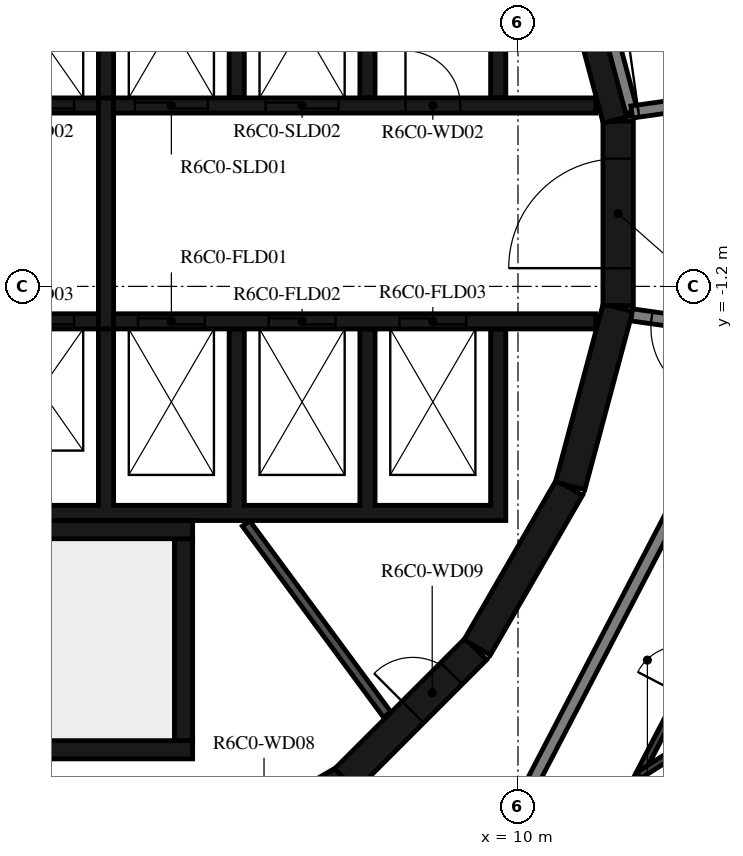
"""IFC4 building model, lengths in metres.
Left out: names, types, materials, properties, quantities, classifications, styles, units other than length and angle.
Written with IfcOpenShell. Run it as: python <this file> out.ifc"""

import sys

from ifc_helpers import new_model, si_unit, direction, frame, frame_2d, origin, place, context, subcontext, project, spatial, polyline, rectangle, outline, extrude, element, fill, save


model = new_model("IFC4")
c1 = context("Model", 3, precision=1e-05, world=origin(), true_north=direction((0.0, 1.0)))
c2 = subcontext(c1, "Body", "Model", "MODEL_VIEW")
j1 = project(units=[si_unit("LENGTHUNIT", "METRE"), si_unit("PLANEANGLEUNIT", "RADIAN")], contexts=[c1])
p1 = place(None, origin())
s1 = spatial("IfcSite", under=j1, at=p1, CompositionType="ELEMENT")
p2 = place(p1, origin())
s2 = spatial("IfcBuilding", under=s1, at=p2, CompositionType="ELEMENT")
p3 = place(p2, frame((0.0, 0.0, 247.7)))
s3 = spatial("IfcBuildingStorey", under=s2, at=p3, CompositionType="ELEMENT", Elevation=247.7)
p4 = place(p3, frame((4.51, -10.845, 0.0), z_axis=(0.0, 0.0, 1.0), x_axis=(0.865975092491, 0.500087131594, 0.0)))
e1 = element("IfcWall", 1, at=p4, inside=s3, PredefinedType="SHEAR", context=c2, shape_type="SweptSolid", body=[
    extrude(rectangle(XDim=3.033, YDim=0.5, at=frame_2d((1.516, 0.0))), origin(), (0.0, 0.0, 1.0), 3.12),
])
p5 = place(p4, frame((1.066, 0.0, 0.0)))
e2 = element("IfcOpeningElement", 2, at=p5, cuts=e1, PredefinedType="OPENING", context=c2, shape_type="SweptSolid", body=[
    extrude(rectangle(XDim=0.9, YDim=2.1, at=frame_2d((0.45, 1.05))), frame((0.0, 0.26, 0.0), z_axis=(0.0, -1.0, 0.0), x_axis=(1.0, 0.0, 0.0)), (0.0, 0.0, 1.0), 0.52),
])
p6 = place(p3, frame((7.164, -9.308, 0.0), z_axis=(0.0, 0.0, 1.0), x_axis=(0.707106781187, 0.707106781187, 0.0)))
e3 = element("IfcWall", 3, at=p6, inside=s3, PredefinedType="SHEAR", context=c2, shape_type="SweptSolid", body=[
    extrude(rectangle(XDim=3.032, YDim=0.5, at=frame_2d((1.516, 0.0))), origin(), (0.0, 0.0, 1.0), 3.12),
])
p7 = place(p6, frame((1.566, 0.0, 0.0)))
e4 = element("IfcOpeningElement", 4, at=p7, cuts=e3, PredefinedType="OPENING", context=c2, shape_type="SweptSolid", body=[
    extrude(rectangle(XDim=0.9, YDim=2.1, at=frame_2d((0.45, 1.05))), frame((0.0, 0.26, 0.0), z_axis=(0.0, -1.0, 0.0), x_axis=(1.0, 0.0, 0.0)), (0.0, 0.0, 1.0), 0.52),
])
for number, where, z_axis, x_axis in (
    (5, (9.329, -7.137, 0.0), (0.0, 0.0, 1.0), (0.5, 0.866, 0.0)),
    (6, (10.858, -4.479, 0.0), (0.0, 0.0, 1.0), (0.259, 0.966, 0.0)),
):
    element("IfcWall", number, at=place(p3, frame(where, z_axis=z_axis, x_axis=x_axis)), inside=s3, PredefinedType="SHEAR", context=c2, shape_type="SweptSolid", body=[
        extrude(rectangle(XDim=3.033, YDim=0.5, at=frame_2d((1.516, 0.0))), origin(), (0.0, 0.0, 1.0), 3.12),
    ])
p8 = place(p3, frame((11.647, -1.516, 0.0), z_axis=(0.0, 0.0, 1.0), x_axis=(0.0, 1.0, 0.0)))
e7 = element("IfcWall", 7, at=p8, inside=s3, PredefinedType="SHEAR", context=c2, shape_type="SweptSolid", body=[
    extrude(rectangle(XDim=3.033, YDim=0.5, at=frame_2d((1.516, 0.0))), origin(), (0.0, 0.0, 1.0), 3.12),
])
p9 = place(p8, frame((0.616, 0.0, 0.0)))
e8 = element("IfcOpeningElement", 8, at=p9, cuts=e7, PredefinedType="OPENING", context=c2, shape_type="SweptSolid", body=[
    extrude(rectangle(XDim=1.8, YDim=2.1, at=frame_2d((0.9, 1.05))), frame((0.0, 0.26, 0.0), z_axis=(0.0, -1.0, 0.0), x_axis=(1.0, 0.0, 0.0)), (0.0, 0.0, 1.0), 0.52),
])
p10 = place(p3, frame((11.643, 1.55, 0.0), z_axis=(0.0, 0.0, 1.0), x_axis=(-0.258734743916, 0.965948410781, 0.0)))
e9 = element("IfcWall", 9, at=p10, inside=s3, PredefinedType="SHEAR", context=c2, shape_type="SweptSolid", body=[
    extrude(rectangle(XDim=3.033, YDim=0.5, at=frame_2d((1.516, 0.0))), origin(), (0.0, 0.0, 1.0), 3.12),
])
p11 = place(p3, frame((-2.4, -5.2, 0.0), z_axis=(0.0, 0.0, 1.0), x_axis=(1.0, 0.0, 0.0)))
e10 = element("IfcWall", 10, at=p11, inside=s3, PredefinedType="SHEAR", context=c2, shape_type="SweptSolid", body=[
    extrude(rectangle(XDim=7.05, YDim=0.3, at=frame_2d((3.525, 0.0))), origin(), (0.0, 0.0, 1.0), 3.12),
])
p12 = place(p3, frame((4.5, -8.67, 0.0), z_axis=(0.0, 0.0, 1.0), x_axis=(0.0, 1.0, 0.0)))
e11 = element("IfcWall", 11, at=p12, inside=s3, PredefinedType="SHEAR", context=c2, shape_type="SweptSolid", body=[
    extrude(rectangle(XDim=3.32, YDim=0.3, at=frame_2d((1.66, 0.0))), origin(), (0.0, 0.0, 1.0), 3.12),
])
p13 = place(p3, frame((0.1, -8.82, 0.0), z_axis=(0.0, 0.0, 1.0), x_axis=(1.0, 0.0, 0.0)))
e12 = element("IfcWall", 12, at=p13, inside=s3, PredefinedType="SHEAR", context=c2, shape_type="SweptSolid", body=[
    extrude(rectangle(XDim=4.55, YDim=0.3, at=frame_2d((2.275, 0.0))), origin(), (0.0, 0.0, 1.0), 3.12),
])
p14 = place(p3, origin())
e13 = element("IfcWall", 13, at=p14, inside=s3, PredefinedType="SHEAR", context=c2, shape_type="SweptSolid", body=[
    extrude(outline(polyline([(-9.55, 4.8), (-1.2, 4.8), (-1.2, 1.9), (-0.95, 1.9), (-0.95, 4.8), (0.95, 4.8), (0.95, 1.9), (1.2, 1.9), (1.2, 4.8), (3.1, 4.8), (3.1, 1.9), (3.35, 1.9), (3.35, 4.8), (5.25, 4.8), (5.25, 1.9), (5.5, 1.9), (5.5, 4.8), (7.4, 4.8), (7.4, 1.9), (7.65, 1.9), (7.65, 4.8), (9.55, 4.8), (9.55, 1.9), (9.8, 1.9), (9.8, 4.8), (9.8, 5.05), (-9.8, 5.05), (-9.8, 4.8), (-9.8, 1.9), (-9.55, 1.9), (-9.55, 4.8)])), origin(), (0.0, 0.0, 1.0), 3.12),
])
p15 = place(p3, origin())
e14 = element("IfcWall", 14, at=p15, inside=s3, PredefinedType="SHEAR", context=c2, shape_type="SweptSolid", body=[
    extrude(outline(polyline([(9.8, -5.05), (9.8, -4.8), (9.8, -1.9), (9.55, -1.9), (9.55, -4.8), (7.65, -4.8), (7.65, -1.9), (7.4, -1.9), (7.4, -4.8), (5.5, -4.8), (5.5, -1.9), (5.25, -1.9), (5.25, -4.8), (3.35, -4.8), (3.35, -1.9), (3.1, -1.9), (3.1, -4.8), (1.2, -4.8), (1.2, -1.9), (0.95, -1.9), (0.95, -4.8), (-0.95, -4.8), (-0.95, -1.9), (-1.2, -1.9), (-1.2, -4.8), (-3.1, -4.8), (-3.1, -1.9), (-3.35, -1.9), (-3.35, -4.8), (-5.25, -4.8), (-5.25, -1.9), (-5.5, -1.9), (-5.5, -4.8), (-7.4, -4.8), (-7.4, -1.9), (-7.65, -1.9), (-7.65, -4.8), (-9.55, -4.8), (-9.55, -1.9), (-9.8, -1.9), (-9.8, -4.8), (-9.8, -5.05), (9.8, -5.05)])), origin(), (0.0, 0.0, 1.0), 3.12),
])
p16 = place(p3, frame((-11.28, 1.775, 0.0), z_axis=(0.0, 0.0, 1.0), x_axis=(1.0, 0.0, 0.0)))
e15 = element("IfcWall", 15, at=p16, inside=s3, PredefinedType="SHEAR", context=c2, shape_type="SweptSolid", body=[
    extrude(rectangle(XDim=14.38, YDim=0.25, at=frame_2d((7.19, 0.0))), origin(), (0.0, 0.0, 1.0), 3.12),
])
p17 = place(p16, frame((10.73, 0.0, 0.0)))
e16 = element("IfcOpeningElement", 16, at=p17, cuts=e15, PredefinedType="OPENING", context=c2, shape_type="SweptSolid", body=[
    extrude(rectangle(XDim=1.1, YDim=2.1, at=frame_2d((0.55, 1.05))), frame((0.0, 0.135, 0.0), z_axis=(0.0, -1.0, 0.0), x_axis=(1.0, 0.0, 0.0)), (0.0, 0.0, 1.0), 0.27),
])
p18 = place(p16, frame((12.88, 0.0, 0.0)))
e17 = element("IfcOpeningElement", 17, at=p18, cuts=e15, PredefinedType="OPENING", context=c2, shape_type="SweptSolid", body=[
    extrude(rectangle(XDim=1.1, YDim=2.1, at=frame_2d((0.55, 1.05))), frame((0.0, 0.135, 0.0), z_axis=(0.0, -1.0, 0.0), x_axis=(1.0, 0.0, 0.0)), (0.0, 0.0, 1.0), 0.27),
])
p19 = place(p16, frame((5.455, 0.0, 0.0)))
e18 = element("IfcOpeningElement", 18, at=p19, cuts=e15, PredefinedType="OPENING", context=c2, shape_type="SweptSolid", body=[
    extrude(rectangle(XDim=0.9, YDim=2.1, at=frame_2d((0.45, 1.05))), frame((0.0, 0.135, 0.0), z_axis=(0.0, -1.0, 0.0), x_axis=(1.0, 0.0, 0.0)), (0.0, 0.0, 1.0), 0.27),
])
p20 = place(p3, frame((3.35, 1.775, 0.0), z_axis=(0.0, 0.0, 1.0), x_axis=(1.0, 0.0, 0.0)))
e19 = element("IfcWall", 19, at=p20, inside=s3, PredefinedType="SHEAR", context=c2, shape_type="SweptSolid", body=[
    extrude(rectangle(XDim=7.93, YDim=0.25, at=frame_2d((3.965, 0.0))), origin(), (0.0, 0.0, 1.0), 3.12),
])
p21 = place(p20, frame((0.35, 0.0, 0.0)))
e20 = element("IfcOpeningElement", 20, at=p21, cuts=e19, PredefinedType="OPENING", context=c2, shape_type="SweptSolid", body=[
    extrude(rectangle(XDim=1.2, YDim=2.4, at=frame_2d((0.6, 1.2))), frame((0.0, 0.135, 0.0), z_axis=(0.0, -1.0, 0.0), x_axis=(1.0, 0.0, 0.0)), (0.0, 0.0, 1.0), 0.27),
])
p22 = place(p20, frame((2.5, 0.0, 0.0)))
e21 = element("IfcOpeningElement", 21, at=p22, cuts=e19, PredefinedType="OPENING", context=c2, shape_type="SweptSolid", body=[
    extrude(rectangle(XDim=1.2, YDim=2.4, at=frame_2d((0.6, 1.2))), frame((0.0, 0.135, 0.0), z_axis=(0.0, -1.0, 0.0), x_axis=(1.0, 0.0, 0.0)), (0.0, 0.0, 1.0), 0.27),
])
p23 = place(p20, frame((4.8, 0.0, 0.0)))
e22 = element("IfcOpeningElement", 22, at=p23, cuts=e19, PredefinedType="OPENING", context=c2, shape_type="SweptSolid", body=[
    extrude(rectangle(XDim=0.9, YDim=2.1, at=frame_2d((0.45, 1.05))), frame((0.0, 0.135, 0.0), z_axis=(0.0, -1.0, 0.0), x_axis=(1.0, 0.0, 0.0)), (0.0, 0.0, 1.0), 0.27),
])
p24 = place(p3, frame((-11.28, -1.775, 0.0), z_axis=(0.0, 0.0, 1.0), x_axis=(1.0, 0.0, 0.0)))
e23 = element("IfcWall", 23, at=p24, inside=s3, PredefinedType="SHEAR", context=c2, shape_type="SweptSolid", body=[
    extrude(rectangle(XDim=14.38, YDim=0.25, at=frame_2d((7.19, 0.0))), origin(), (0.0, 0.0, 1.0), 3.12),
])
p25 = place(p24, frame((12.88, 0.0, 0.0)))
e24 = element("IfcOpeningElement", 24, at=p25, cuts=e23, PredefinedType="OPENING", context=c2, shape_type="SweptSolid", body=[
    extrude(rectangle(XDim=1.1, YDim=2.1, at=frame_2d((0.55, 1.05))), frame((0.0, 0.135, 0.0), z_axis=(0.0, -1.0, 0.0), x_axis=(1.0, 0.0, 0.0)), (0.0, 0.0, 1.0), 0.27),
])
p26 = place(p24, frame((6.53, 0.0, 0.0)))
e25 = element("IfcOpeningElement", 25, at=p26, cuts=e23, PredefinedType="OPENING", context=c2, shape_type="SweptSolid", body=[
    extrude(rectangle(XDim=0.9, YDim=2.1, at=frame_2d((0.45, 1.05))), frame((0.0, 0.135, 0.0), z_axis=(0.0, -1.0, 0.0), x_axis=(1.0, 0.0, 0.0)), (0.0, 0.0, 1.0), 0.27),
])
p27 = place(p24, frame((8.68, 0.0, 0.0)))
e26 = element("IfcOpeningElement", 26, at=p27, cuts=e23, PredefinedType="OPENING", context=c2, shape_type="SweptSolid", body=[
    extrude(rectangle(XDim=0.9, YDim=2.1, at=frame_2d((0.45, 1.05))), frame((0.0, 0.135, 0.0), z_axis=(0.0, -1.0, 0.0), x_axis=(1.0, 0.0, 0.0)), (0.0, 0.0, 1.0), 0.27),
])
p28 = place(p24, frame((10.83, 0.0, 0.0)))
e27 = element("IfcOpeningElement", 27, at=p28, cuts=e23, PredefinedType="OPENING", context=c2, shape_type="SweptSolid", body=[
    extrude(rectangle(XDim=0.9, YDim=2.1, at=frame_2d((0.45, 1.05))), frame((0.0, 0.135, 0.0), z_axis=(0.0, -1.0, 0.0), x_axis=(1.0, 0.0, 0.0)), (0.0, 0.0, 1.0), 0.27),
])
p29 = place(p3, frame((3.35, -1.775, 0.0), z_axis=(0.0, 0.0, 1.0), x_axis=(1.0, 0.0, 0.0)))
e28 = element("IfcWall", 28, at=p29, inside=s3, PredefinedType="SHEAR", context=c2, shape_type="SweptSolid", body=[
    extrude(rectangle(XDim=7.93, YDim=0.25, at=frame_2d((3.965, 0.0))), origin(), (0.0, 0.0, 1.0), 3.12),
])
p30 = place(p29, frame((0.4, 0.0, 0.0)))
e29 = element("IfcOpeningElement", 29, at=p30, cuts=e28, PredefinedType="OPENING", context=c2, shape_type="SweptSolid", body=[
    extrude(rectangle(XDim=1.1, YDim=2.4, at=frame_2d((0.55, 1.2))), frame((0.0, 0.135, 0.0), z_axis=(0.0, -1.0, 0.0), x_axis=(1.0, 0.0, 0.0)), (0.0, 0.0, 1.0), 0.27),
])
p31 = place(p29, frame((2.55, 0.0, 0.0)))
e30 = element("IfcOpeningElement", 30, at=p31, cuts=e28, PredefinedType="OPENING", context=c2, shape_type="SweptSolid", body=[
    extrude(rectangle(XDim=1.1, YDim=2.4, at=frame_2d((0.55, 1.2))), frame((0.0, 0.135, 0.0), z_axis=(0.0, -1.0, 0.0), x_axis=(1.0, 0.0, 0.0)), (0.0, 0.0, 1.0), 0.27),
])
p32 = place(p29, frame((4.7, 0.0, 0.0)))
e31 = element("IfcOpeningElement", 31, at=p32, cuts=e28, PredefinedType="OPENING", context=c2, shape_type="SweptSolid", body=[
    extrude(rectangle(XDim=1.1, YDim=2.4, at=frame_2d((0.55, 1.2))), frame((0.0, 0.135, 0.0), z_axis=(0.0, -1.0, 0.0), x_axis=(1.0, 0.0, 0.0)), (0.0, 0.0, 1.0), 0.27),
])
p33 = place(p3, frame((3.225, -1.9, 0.0), z_axis=(0.0, 0.0, 1.0), x_axis=(0.0, 1.0, 0.0)))
e32 = element("IfcWall", 32, at=p33, inside=s3, PredefinedType="SHEAR", context=c2, shape_type="SweptSolid", body=[
    extrude(rectangle(XDim=3.8, YDim=0.25, at=frame_2d((1.9, 0.0))), origin(), (0.0, 0.0, 1.0), 3.12),
])
p34 = place(p3, frame((5.528, -5.098, 0.0), z_axis=(0.0, 0.0, 1.0), x_axis=(0.594034318069, -0.804439698769, 0.0)))
e33 = element("IfcWall", 33, at=p34, inside=s3, PredefinedType="PARTITIONING", context=c2, shape_type="SweptSolid", body=[
    extrude(rectangle(XDim=3.907, YDim=0.15, at=frame_2d((1.953, 0.0))), origin(), (0.0, 0.0, 1.0), 3.12),
])
p35 = place(p3, frame((11.87, 1.668, 0.0), z_axis=(0.0, 0.0, 1.0), x_axis=(-0.258836880648, 0.965921047093, 0.0)))
e34 = element("IfcWall", 34, at=p35, inside=s3, PredefinedType="STANDARD", context=c2, shape_type="SweptSolid", body=[
    extrude(rectangle(XDim=1.695, YDim=0.2, at=frame_2d((0.848, 0.0))), origin(), (0.0, 0.0, 1.0), 3.12),
])
p36 = place(p3, frame((11.87, 1.668, 0.0), z_axis=(0.0, 0.0, 1.0), x_axis=(0.990267985606, 0.139173692496, 0.0)))
e35 = element("IfcWall", 35, at=p36, inside=s3, PredefinedType="STANDARD", context=c2, shape_type="SweptSolid", body=[
    extrude(rectangle(XDim=1.475, YDim=0.2, at=frame_2d((0.738, 0.0))), origin(), (0.0, 0.0, 1.0), 3.12),
])
p37 = place(p36, frame((0.11, 0.0, 0.0)))
e36 = element("IfcOpeningElement", 36, at=p37, cuts=e35, PredefinedType="OPENING", context=c2, shape_type="SweptSolid", body=[
    extrude(rectangle(XDim=1.2, YDim=2.1, at=frame_2d((0.6, 1.05))), frame((0.0, 0.11, 0.0), z_axis=(0.0, -1.0, 0.0), x_axis=(1.0, 0.0, 0.0)), (0.0, 0.0, 1.0), 0.22),
])
p38 = place(p3, frame((10.228, -9.372, 0.0), z_axis=(0.0, 0.0, 1.0), x_axis=(0.461759464021, 0.887005184532, 0.0)))
e37 = element("IfcWall", 37, at=p38, inside=s3, PredefinedType="STANDARD", context=c2, shape_type="SweptSolid", body=[
    extrude(rectangle(XDim=7.181, YDim=0.2, at=frame_2d((3.591, 0.0))), origin(), (0.0, 0.0, 1.0), 3.12),
])
p39 = place(p3, frame((13.496, -1.897, 0.0), z_axis=(0.0, 0.0, 1.0), x_axis=(-0.99026234641, 0.139213811391, 0.0)))
e38 = element("IfcWall", 38, at=p39, inside=s3, PredefinedType="STANDARD", context=c2, shape_type="SweptSolid", body=[
    extrude(rectangle(XDim=1.641, YDim=0.2, at=frame_2d((0.821, 0.0))), origin(), (0.0, 0.0, 1.0), 3.12),
])
p40 = place(p39, frame((0.11, 0.0, 0.0)))
e39 = element("IfcOpeningElement", 39, at=p40, cuts=e38, PredefinedType="OPENING", context=c2, shape_type="SweptSolid", body=[
    extrude(rectangle(XDim=1.2, YDim=2.1, at=frame_2d((0.6, 1.05))), frame((0.0, 0.11, 0.0), z_axis=(0.0, -1.0, 0.0), x_axis=(1.0, 0.0, 0.0)), (0.0, 0.0, 1.0), 0.22),
])
p41 = place(p3, frame((11.373, -10.421, 0.0), z_axis=(0.0, 0.0, 1.0), x_axis=(0.461738939635, 0.887015868869, 0.0)))
e40 = element("IfcWall", 40, at=p41, inside=s3, PredefinedType="PARTITIONING", context=c2, shape_type="SweptSolid", body=[
    extrude(rectangle(XDim=5.752, YDim=0.12, at=frame_2d((2.876, 0.0))), origin(), (0.0, 0.0, 1.0), 3.12),
])
p42 = place(p41, frame((2.831, 0.0, 0.0)))
e41 = element("IfcOpeningElement", 41, at=p42, cuts=e40, PredefinedType="OPENING", context=c2, shape_type="SweptSolid", body=[
    extrude(rectangle(XDim=0.8, YDim=2.1, at=frame_2d((0.4, 1.05))), frame((0.0, 0.07, 0.0), z_axis=(0.0, -1.0, 0.0), x_axis=(1.0, 0.0, 0.0)), (0.0, 0.0, 1.0), 0.14),
])
p43 = place(p3, frame((21.837, -2.966, 0.0), z_axis=(0.0, 0.0, 1.0), x_axis=(-0.843394529709, -0.537294767569, 0.0)))
e42 = element("IfcWall", 42, at=p43, inside=s3, PredefinedType="PARTITIONING", context=c2, shape_type="SweptSolid", body=[
    extrude(rectangle(XDim=11.678, YDim=0.12, at=frame_2d((5.839, 0.0))), origin(), (0.0, 0.0, 1.0), 3.12),
])
p44 = place(p43, frame((0.2, 0.0, 0.0)))
e43 = element("IfcOpeningElement", 43, at=p44, cuts=e42, PredefinedType="OPENING", context=c2, shape_type="SweptSolid", body=[
    extrude(rectangle(XDim=0.9, YDim=2.1, at=frame_2d((0.45, 1.05))), frame((0.0, 0.07, 0.0), z_axis=(0.0, -1.0, 0.0), x_axis=(1.0, 0.0, 0.0)), (0.0, 0.0, 1.0), 0.14),
])
p45 = place(p9, origin())
e44 = element("IfcDoor", 44, at=p45, inside=s3, OperationType="DOUBLE_DOOR_SINGLE_SWING", PredefinedType="DOOR", context=c2, shape_type="SweptSolid", body=[
    extrude(rectangle(XDim=1.8, YDim=2.1, at=frame_2d((0.9, 1.05))), frame((0.0, 0.025, 0.0), z_axis=(0.0, -1.0, 0.0), x_axis=(1.0, 0.0, 0.0)), (0.0, 0.0, 1.0), 0.05),
])
fill(e8, e44)
p46 = place(p18, origin())
e45 = element("IfcDoor", 45, at=p46, inside=s3, OperationType="DOUBLE_DOOR_SLIDING", PredefinedType="DOOR", context=c2, shape_type="SweptSolid", body=[
    extrude(rectangle(XDim=1.1, YDim=2.1, at=frame_2d((0.55, 1.05))), frame((0.0, 0.025, 0.0), z_axis=(0.0, -1.0, 0.0), x_axis=(1.0, 0.0, 0.0)), (0.0, 0.0, 1.0), 0.05),
])
fill(e17, e45)
p47 = place(p21, origin())
e46 = element("IfcDoor", 46, at=p47, inside=s3, OperationType="DOUBLE_DOOR_SLIDING", PredefinedType="DOOR", context=c2, shape_type="SweptSolid", body=[
    extrude(rectangle(XDim=1.2, YDim=2.4, at=frame_2d((0.6, 1.2))), frame((0.0, 0.025, 0.0), z_axis=(0.0, -1.0, 0.0), x_axis=(1.0, 0.0, 0.0)), (0.0, 0.0, 1.0), 0.05),
])
fill(e20, e46)
p48 = place(p22, origin())
e47 = element("IfcDoor", 47, at=p48, inside=s3, OperationType="DOUBLE_DOOR_SLIDING", PredefinedType="DOOR", context=c2, shape_type="SweptSolid", body=[
    extrude(rectangle(XDim=1.2, YDim=2.4, at=frame_2d((0.6, 1.2))), frame((0.0, 0.025, 0.0), z_axis=(0.0, -1.0, 0.0), x_axis=(1.0, 0.0, 0.0)), (0.0, 0.0, 1.0), 0.05),
])
fill(e21, e47)
p49 = place(p25, origin())
e48 = element("IfcDoor", 48, at=p49, inside=s3, OperationType="DOUBLE_DOOR_SLIDING", PredefinedType="DOOR", context=c2, shape_type="SweptSolid", body=[
    extrude(rectangle(XDim=1.1, YDim=2.1, at=frame_2d((0.55, 1.05))), frame((0.0, 0.025, 0.0), z_axis=(0.0, -1.0, 0.0), x_axis=(1.0, 0.0, 0.0)), (0.0, 0.0, 1.0), 0.05),
])
fill(e24, e48)
p50 = place(p30, origin())
e49 = element("IfcDoor", 49, at=p50, inside=s3, OperationType="DOUBLE_DOOR_SLIDING", PredefinedType="DOOR", context=c2, shape_type="SweptSolid", body=[
    extrude(rectangle(XDim=1.1, YDim=2.4, at=frame_2d((0.55, 1.2))), frame((0.0, 0.025, 0.0), z_axis=(0.0, -1.0, 0.0), x_axis=(1.0, 0.0, 0.0)), (0.0, 0.0, 1.0), 0.05),
])
fill(e29, e49)
p51 = place(p31, origin())
e50 = element("IfcDoor", 50, at=p51, inside=s3, OperationType="DOUBLE_DOOR_SLIDING", PredefinedType="DOOR", context=c2, shape_type="SweptSolid", body=[
    extrude(rectangle(XDim=1.1, YDim=2.4, at=frame_2d((0.55, 1.2))), frame((0.0, 0.025, 0.0), z_axis=(0.0, -1.0, 0.0), x_axis=(1.0, 0.0, 0.0)), (0.0, 0.0, 1.0), 0.05),
])
fill(e30, e50)
p52 = place(p32, origin())
e51 = element("IfcDoor", 51, at=p52, inside=s3, OperationType="DOUBLE_DOOR_SLIDING", PredefinedType="DOOR", context=c2, shape_type="SweptSolid", body=[
    extrude(rectangle(XDim=1.1, YDim=2.4, at=frame_2d((0.55, 1.2))), frame((0.0, 0.025, 0.0), z_axis=(0.0, -1.0, 0.0), x_axis=(1.0, 0.0, 0.0)), (0.0, 0.0, 1.0), 0.05),
])
fill(e31, e51)
p53 = place(p23, origin())
e52 = element("IfcDoor", 52, at=p53, inside=s3, OperationType="SINGLE_SWING_RIGHT", PredefinedType="DOOR", context=c2, shape_type="SweptSolid", body=[
    extrude(rectangle(XDim=0.9, YDim=2.1, at=frame_2d((0.45, 1.05))), frame((0.0, 0.025, 0.0), z_axis=(0.0, -1.0, 0.0), x_axis=(1.0, 0.0, 0.0)), (0.0, 0.0, 1.0), 0.05),
])
fill(e22, e52)
p54 = place(p7, origin())
e53 = element("IfcDoor", 53, at=p54, inside=s3, OperationType="SINGLE_SWING_LEFT", PredefinedType="DOOR", context=c2, shape_type="SweptSolid", body=[
    extrude(rectangle(XDim=0.9, YDim=2.1, at=frame_2d((0.45, 1.05))), frame((0.0, 0.025, 0.0), z_axis=(0.0, -1.0, 0.0), x_axis=(1.0, 0.0, 0.0)), (0.0, 0.0, 1.0), 0.05),
])
fill(e4, e53)
p55 = place(p37, origin())
e54 = element("IfcDoor", 54, at=p55, inside=s3, OperationType="DOUBLE_DOOR_SINGLE_SWING", PredefinedType="DOOR", context=c2, shape_type="SweptSolid", body=[
    extrude(rectangle(XDim=1.2, YDim=2.1, at=frame_2d((0.6, 1.05))), frame((0.0, 0.025, 0.0), z_axis=(0.0, -1.0, 0.0), x_axis=(1.0, 0.0, 0.0)), (0.0, 0.0, 1.0), 0.05),
])
fill(e36, e54)
p56 = place(p40, origin())
e55 = element("IfcDoor", 55, at=p56, inside=s3, OperationType="DOUBLE_DOOR_SINGLE_SWING", PredefinedType="DOOR", context=c2, shape_type="SweptSolid", body=[
    extrude(rectangle(XDim=1.2, YDim=2.1, at=frame_2d((0.6, 1.05))), frame((0.0, 0.025, 0.0), z_axis=(0.0, -1.0, 0.0), x_axis=(1.0, 0.0, 0.0)), (0.0, 0.0, 1.0), 0.05),
])
fill(e39, e55)
save(model, sys.argv[1])
